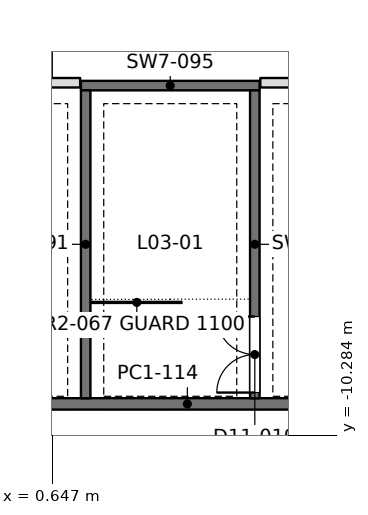
"""IFC4 building model, lengths in metres.
Left out: names, types, materials, properties, quantities, classifications, styles, units other than length and angle.
Written with IfcOpenShell. Run it as: python <this file> out.ifc"""

import sys

from ifc_helpers import new_model, si_unit, direction, frame, frame_2d, origin, place, context, subcontext, project, spatial, rectangle, extrude, element, fill, save


model = new_model("IFC4")
c1 = context("Model", 3, precision=1e-05, world=origin(), true_north=direction((0.0, 1.0)))
c2 = subcontext(c1, "Body", "Model", "MODEL_VIEW")
j1 = project(units=[si_unit("LENGTHUNIT", "METRE"), si_unit("PLANEANGLEUNIT", "RADIAN")], contexts=[c1])
p1 = place(None, origin())
s1 = spatial("IfcSite", under=j1, at=p1, CompositionType="ELEMENT")
p2 = place(p1, origin())
s2 = spatial("IfcBuilding", under=s1, at=p2, CompositionType="ELEMENT")
p3 = place(p2, frame((0.0, 0.0, 14.4)))
s3 = spatial("IfcBuildingStorey", under=s2, at=p3, CompositionType="ELEMENT", Elevation=14.4)
p4 = place(p3, frame((8.4, -9.45, 0.0), z_axis=(0.0, 0.0, 1.0), x_axis=(-1.0, 0.0, 0.0)))
e1 = element("IfcWall", 1, at=p4, inside=s3, PredefinedType="SOLIDWALL", context=c2, shape_type="SweptSolid", body=[
    extrude(rectangle(XDim=8.4, YDim=0.3, at=frame_2d((4.2, 0.0))), origin(), (0.0, 0.0, 1.0), 4.25),
])
p5 = place(p3, frame((-1.0, -1.0, 0.0), z_axis=(0.0, 0.0, 1.0), x_axis=(1.0, 0.0, 0.0)))
e2 = element("IfcWall", 2, at=p5, inside=s3, PredefinedType="PARTITIONING", context=c2, shape_type="SweptSolid", body=[
    extrude(rectangle(XDim=2.38, YDim=0.25, at=frame_2d((1.19, 0.0))), origin(), (0.0, 0.0, 1.0), 3.6),
])
p6 = place(p3, frame((6.12, -1.0, 0.0), z_axis=(0.0, 0.0, 1.0), x_axis=(1.0, 0.0, 0.0)))
e3 = element("IfcWall", 3, at=p6, inside=s3, PredefinedType="PARTITIONING", context=c2, shape_type="SweptSolid", body=[
    extrude(rectangle(XDim=38.16, YDim=0.25, at=frame_2d((19.08, 0.0))), origin(), (0.0, 0.0, 1.0), 3.45),
])
p7 = place(p6, frame((13.88, 0.0, 0.0)))
e4 = element("IfcOpeningElement", 4, at=p7, cuts=e3, PredefinedType="OPENING", context=c2, shape_type="SweptSolid", body=[
    extrude(rectangle(XDim=2.0, YDim=2.4, at=frame_2d((1.0, 1.2))), frame((0.0, 0.135, 0.0), z_axis=(0.0, -1.0, 0.0), x_axis=(1.0, 0.0, 0.0)), (0.0, 0.0, 1.0), 0.27),
])
p8 = place(p6, frame((22.28, 0.0, 0.0)))
e5 = element("IfcOpeningElement", 5, at=p8, cuts=e3, PredefinedType="OPENING", context=c2, shape_type="SweptSolid", body=[
    extrude(rectangle(XDim=2.0, YDim=2.4, at=frame_2d((1.0, 1.2))), frame((0.0, 0.135, 0.0), z_axis=(0.0, -1.0, 0.0), x_axis=(1.0, 0.0, 0.0)), (0.0, 0.0, 1.0), 0.27),
])
p9 = place(p3, frame((1.525, -9.302, 0.0), z_axis=(0.0, 0.0, 1.0), x_axis=(0.0, 1.0, 0.0)))
e6 = element("IfcWall", 6, at=p9, inside=s3, PredefinedType="SOLIDWALL", context=c2, shape_type="SweptSolid", body=[
    extrude(rectangle(XDim=8.102, YDim=0.25, at=frame_2d((4.051, 0.0))), origin(), (0.0, 0.0, 1.0), 4.5),
])
p10 = place(p3, frame((5.975, -9.302, 0.0), z_axis=(0.0, 0.0, 1.0), x_axis=(0.0, 1.0, 0.0)))
e7 = element("IfcWall", 7, at=p10, inside=s3, PredefinedType="SOLIDWALL", context=c2, shape_type="SweptSolid", body=[
    extrude(rectangle(XDim=8.102, YDim=0.25, at=frame_2d((4.051, 0.0))), origin(), (0.0, 0.0, 1.0), 4.5),
])
p11 = place(p10, frame((0.15, 0.0, 0.0)))
e8 = element("IfcOpeningElement", 8, at=p11, cuts=e7, PredefinedType="OPENING", context=c2, shape_type="SweptSolid", body=[
    extrude(rectangle(XDim=2.0, YDim=2.2, at=frame_2d((1.0, 1.1))), frame((0.0, 0.135, 0.0), z_axis=(0.0, -1.0, 0.0), x_axis=(1.0, 0.0, 0.0)), (0.0, 0.0, 1.0), 0.27),
])
p12 = place(p3, frame((1.4, -1.075, 0.0), z_axis=(0.0, 0.0, 1.0), x_axis=(1.0, 0.0, 0.0)))
e9 = element("IfcWall", 9, at=p12, inside=s3, PredefinedType="SOLIDWALL", context=c2, shape_type="SweptSolid", body=[
    extrude(rectangle(XDim=4.7, YDim=0.25, at=frame_2d((2.35, 0.0))), origin(), (0.0, 0.0, 1.0), 4.5),
])
p13 = place(p11, origin())
e10 = element("IfcDoor", 10, at=p13, inside=s3, OperationType="DOUBLE_DOOR_SINGLE_SWING", PredefinedType="DOOR", context=c2, shape_type="SweptSolid", body=[
    extrude(rectangle(XDim=2.0, YDim=2.2, at=frame_2d((1.0, 1.1))), frame((0.0, 0.025, 0.0), z_axis=(0.0, -1.0, 0.0), x_axis=(1.0, 0.0, 0.0)), (0.0, 0.0, 1.0), 0.05),
])
fill(e8, e10)
save(model, sys.argv[1])
